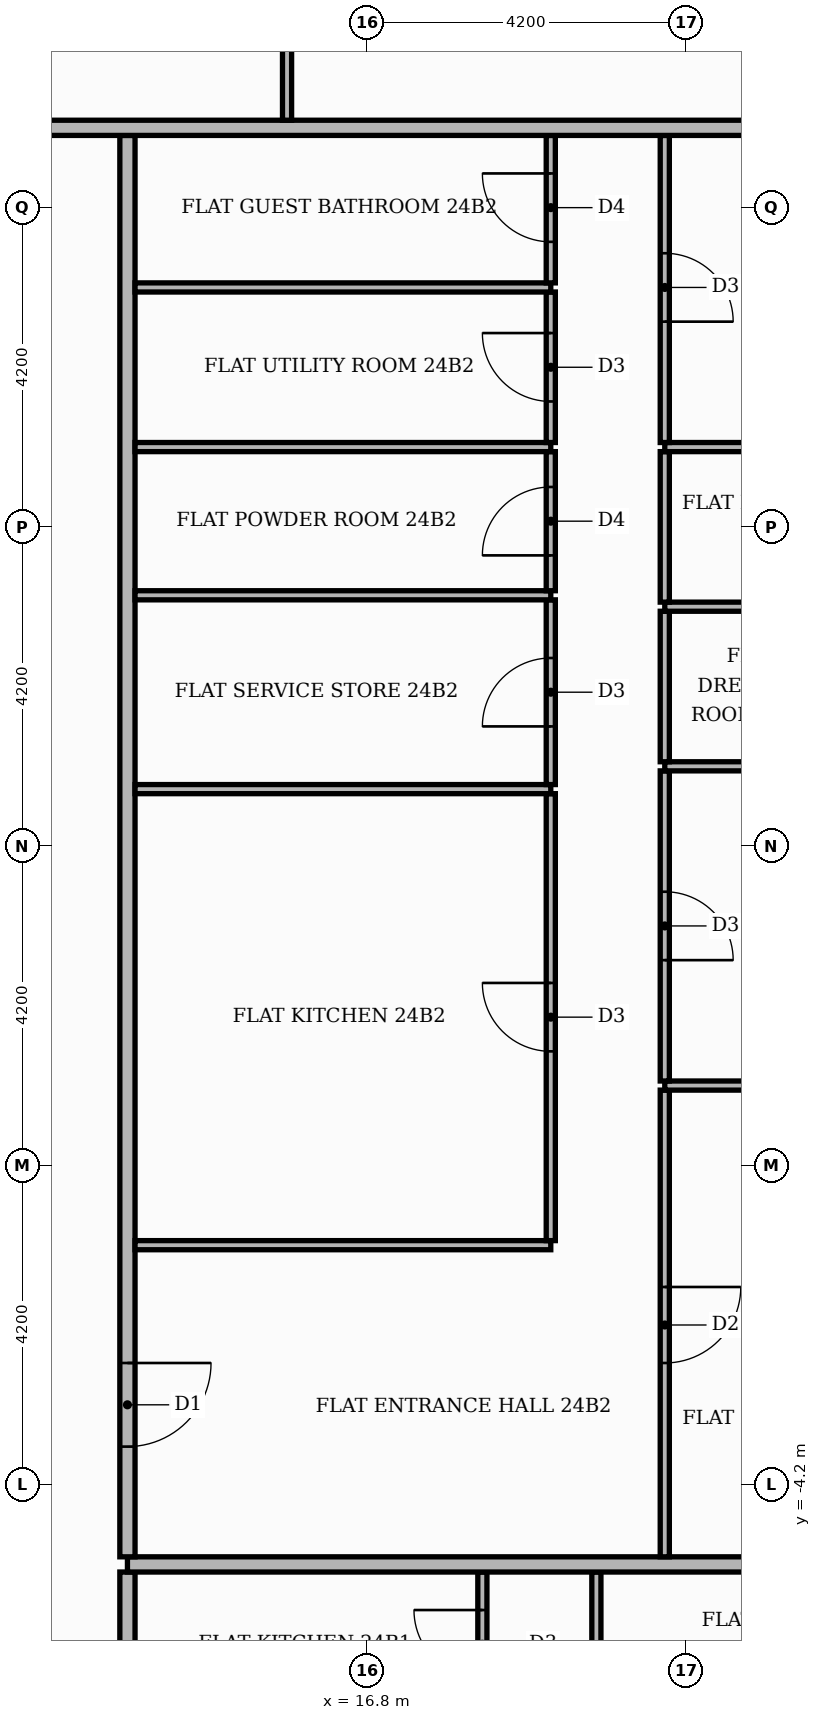
"""IFC4 building model, lengths in metres.
Left out: names, types, materials, properties, quantities, classifications, styles, units other than length and angle.
Written with IfcOpenShell. Run it as: python <this file> out.ifc"""

import sys

from ifc_helpers import new_model, si_unit, direction, frame, frame_2d, origin, place, context, subcontext, project, spatial, rectangle, extrude, element, fill, save


model = new_model("IFC4")
c1 = context("Model", 3, precision=1e-05, world=origin(), true_north=direction((0.0, 1.0)))
c2 = subcontext(c1, "Body", "Model", "MODEL_VIEW")
j1 = project(units=[si_unit("LENGTHUNIT", "METRE"), si_unit("PLANEANGLEUNIT", "RADIAN")], contexts=[c1])
p1 = place(None, origin())
s1 = spatial("IfcSite", under=j1, at=p1, CompositionType="ELEMENT")
p2 = place(p1, origin())
s2 = spatial("IfcBuilding", under=s1, at=p2, CompositionType="ELEMENT")
p3 = place(p2, frame((0.0, 0.0, 102.6)))
s3 = spatial("IfcBuildingStorey", under=s2, at=p3, CompositionType="ELEMENT", Elevation=102.6)
p4 = place(p3, frame((13.65, -13.55, 0.0), z_axis=(0.0, 0.0, 1.0), x_axis=(0.0, 1.0, 0.0)))
e1 = element("IfcWall", 1, at=p4, inside=s3, PredefinedType="PARTITIONING", context=c2, shape_type="SweptSolid", body=[
    extrude(rectangle(XDim=8.2, YDim=0.2, at=frame_2d((4.1, 0.0))), origin(), (0.0, 0.0, 1.0), 3.48),
])
p5 = place(p4, frame((1.45, 0.0, 0.0)))
e2 = element("IfcOpeningElement", 2, at=p5, cuts=e1, PredefinedType="OPENING", context=c2, shape_type="SweptSolid", body=[
    extrude(rectangle(XDim=1.1, YDim=2.4, at=frame_2d((0.55, 1.2))), frame((0.0, 0.11, 0.0), z_axis=(0.0, -1.0, 0.0), x_axis=(1.0, 0.0, 0.0)), (0.0, 0.0, 1.0), 0.22),
])
p6 = place(p3, frame((18.32, -7.29, 0.0), z_axis=(0.0, 0.0, 1.0), x_axis=(0.0, 1.0, 0.0)))
e3 = element("IfcWall", 3, at=p6, inside=s3, PredefinedType="PARTITIONING", context=c2, shape_type="SweptSolid", body=[
    extrude(rectangle(XDim=1.94, YDim=0.12, at=frame_2d((0.97, 0.0))), origin(), (0.0, 0.0, 1.0), 3.48),
])
p7 = place(p6, frame((0.54, 0.0, 0.0)))
e4 = element("IfcOpeningElement", 4, at=p7, cuts=e3, PredefinedType="OPENING", context=c2, shape_type="SweptSolid", body=[
    extrude(rectangle(XDim=0.9, YDim=2.1, at=frame_2d((0.45, 1.05))), frame((0.0, 0.07, 0.0), z_axis=(0.0, -1.0, 0.0), x_axis=(1.0, 0.0, 0.0)), (0.0, 0.0, 1.0), 0.14),
])
p8 = place(p3, frame((19.82, -7.29, 0.0), z_axis=(0.0, 0.0, 1.0), x_axis=(0.0, 1.0, 0.0)))
e5 = element("IfcWall", 5, at=p8, inside=s3, PredefinedType="PARTITIONING", context=c2, shape_type="SweptSolid", body=[
    extrude(rectangle(XDim=1.94, YDim=0.12, at=frame_2d((0.97, 0.0))), origin(), (0.0, 0.0, 1.0), 3.48),
])
p9 = place(p3, frame((13.65, -5.25, 0.0), z_axis=(0.0, 0.0, 1.0), x_axis=(1.0, 0.0, 0.0)))
e6 = element("IfcWall", 6, at=p9, inside=s3, PredefinedType="PARTITIONING", context=c2, shape_type="SweptSolid", body=[
    extrude(rectangle(XDim=11.77, YDim=0.2, at=frame_2d((5.885, 0.0))), origin(), (0.0, 0.0, 1.0), 3.48),
])
p10 = place(p3, frame((13.65, -5.15, 0.0), z_axis=(0.0, 0.0, 1.0), x_axis=(0.0, 1.0, 0.0)))
e7 = element("IfcWall", 7, at=p10, inside=s3, PredefinedType="PARTITIONING", context=c2, shape_type="SweptSolid", body=[
    extrude(rectangle(XDim=18.7, YDim=0.2, at=frame_2d((9.35, 0.0))), origin(), (0.0, 0.0, 1.0), 3.48),
])
p11 = place(p10, frame((1.45, 0.0, 0.0)))
e8 = element("IfcOpeningElement", 8, at=p11, cuts=e7, PredefinedType="OPENING", context=c2, shape_type="SweptSolid", body=[
    extrude(rectangle(XDim=1.1, YDim=2.4, at=frame_2d((0.55, 1.2))), frame((0.0, 0.11, 0.0), z_axis=(0.0, -1.0, 0.0), x_axis=(1.0, 0.0, 0.0)), (0.0, 0.0, 1.0), 0.22),
])
p12 = place(p3, frame((20.72, -5.15, 0.0), z_axis=(0.0, 0.0, 1.0), x_axis=(0.0, 1.0, 0.0)))
e9 = element("IfcWall", 9, at=p12, inside=s3, PredefinedType="PARTITIONING", context=c2, shape_type="SweptSolid", body=[
    extrude(rectangle(XDim=6.14, YDim=0.12, at=frame_2d((3.07, 0.0))), origin(), (0.0, 0.0, 1.0), 3.48),
])
p13 = place(p12, frame((2.55, 0.0, 0.0)))
e10 = element("IfcOpeningElement", 10, at=p13, cuts=e9, PredefinedType="OPENING", context=c2, shape_type="SweptSolid", body=[
    extrude(rectangle(XDim=1.0, YDim=2.1, at=frame_2d((0.5, 1.05))), frame((0.0, 0.07, 0.0), z_axis=(0.0, -1.0, 0.0), x_axis=(1.0, 0.0, 0.0)), (0.0, 0.0, 1.0), 0.14),
])
p14 = place(p3, frame((13.75, -1.05, 0.0), z_axis=(0.0, 0.0, 1.0), x_axis=(1.0, 0.0, 0.0)))
e11 = element("IfcWall", 11, at=p14, inside=s3, PredefinedType="PARTITIONING", context=c2, shape_type="SweptSolid", body=[
    extrude(rectangle(XDim=5.47, YDim=0.12, at=frame_2d((2.735, 0.0))), origin(), (0.0, 0.0, 1.0), 3.48),
])
p15 = place(p3, frame((19.22, -0.99, 0.0), z_axis=(0.0, 0.0, 1.0), x_axis=(0.0, 1.0, 0.0)))
e12 = element("IfcWall", 12, at=p15, inside=s3, PredefinedType="PARTITIONING", context=c2, shape_type="SweptSolid", body=[
    extrude(rectangle(XDim=5.88, YDim=0.12, at=frame_2d((2.94, 0.0))), origin(), (0.0, 0.0, 1.0), 3.48),
])
p16 = place(p15, frame((2.49, 0.0, 0.0)))
e13 = element("IfcOpeningElement", 13, at=p16, cuts=e12, PredefinedType="OPENING", context=c2, shape_type="SweptSolid", body=[
    extrude(rectangle(XDim=0.9, YDim=2.1, at=frame_2d((0.45, 1.05))), frame((0.0, 0.07, 0.0), z_axis=(0.0, -1.0, 0.0), x_axis=(1.0, 0.0, 0.0)), (0.0, 0.0, 1.0), 0.14),
])
p17 = place(p3, frame((20.72, 1.05, 0.0), z_axis=(0.0, 0.0, 1.0), x_axis=(1.0, 0.0, 0.0)))
e14 = element("IfcWall", 14, at=p17, inside=s3, PredefinedType="PARTITIONING", context=c2, shape_type="SweptSolid", body=[
    extrude(rectangle(XDim=4.7, YDim=0.12, at=frame_2d((2.35, 0.0))), origin(), (0.0, 0.0, 1.0), 3.48),
])
p18 = place(p3, frame((20.72, 1.11, 0.0), z_axis=(0.0, 0.0, 1.0), x_axis=(0.0, 1.0, 0.0)))
e15 = element("IfcWall", 15, at=p18, inside=s3, PredefinedType="PARTITIONING", context=c2, shape_type="SweptSolid", body=[
    extrude(rectangle(XDim=4.08, YDim=0.12, at=frame_2d((2.04, 0.0))), origin(), (0.0, 0.0, 1.0), 3.48),
])
p19 = place(p18, frame((1.59, 0.0, 0.0)))
e16 = element("IfcOpeningElement", 16, at=p19, cuts=e15, PredefinedType="OPENING", context=c2, shape_type="SweptSolid", body=[
    extrude(rectangle(XDim=0.9, YDim=2.1, at=frame_2d((0.45, 1.05))), frame((0.0, 0.07, 0.0), z_axis=(0.0, -1.0, 0.0), x_axis=(1.0, 0.0, 0.0)), (0.0, 0.0, 1.0), 0.14),
])
p20 = place(p3, frame((13.75, 4.95, 0.0), z_axis=(0.0, 0.0, 1.0), x_axis=(1.0, 0.0, 0.0)))
e17 = element("IfcWall", 17, at=p20, inside=s3, PredefinedType="PARTITIONING", context=c2, shape_type="SweptSolid", body=[
    extrude(rectangle(XDim=5.47, YDim=0.12, at=frame_2d((2.735, 0.0))), origin(), (0.0, 0.0, 1.0), 3.48),
])
p21 = place(p3, frame((19.22, 5.01, 0.0), z_axis=(0.0, 0.0, 1.0), x_axis=(0.0, 1.0, 0.0)))
e18 = element("IfcWall", 18, at=p21, inside=s3, PredefinedType="PARTITIONING", context=c2, shape_type="SweptSolid", body=[
    extrude(rectangle(XDim=2.43, YDim=0.12, at=frame_2d((1.215, 0.0))), origin(), (0.0, 0.0, 1.0), 3.48),
])
p22 = place(p21, frame((0.765, 0.0, 0.0)))
e19 = element("IfcOpeningElement", 19, at=p22, cuts=e18, PredefinedType="OPENING", context=c2, shape_type="SweptSolid", body=[
    extrude(rectangle(XDim=0.9, YDim=2.1, at=frame_2d((0.45, 1.05))), frame((0.0, 0.07, 0.0), z_axis=(0.0, -1.0, 0.0), x_axis=(1.0, 0.0, 0.0)), (0.0, 0.0, 1.0), 0.14),
])
p23 = place(p3, frame((20.72, 5.25, 0.0), z_axis=(0.0, 0.0, 1.0), x_axis=(1.0, 0.0, 0.0)))
e20 = element("IfcWall", 20, at=p23, inside=s3, PredefinedType="PARTITIONING", context=c2, shape_type="SweptSolid", body=[
    extrude(rectangle(XDim=4.7, YDim=0.12, at=frame_2d((2.35, 0.0))), origin(), (0.0, 0.0, 1.0), 3.48),
])
p24 = place(p23, frame((2.05, 0.0, 0.0)))
e21 = element("IfcOpeningElement", 21, at=p24, cuts=e20, PredefinedType="OPENING", context=c2, shape_type="SweptSolid", body=[
    extrude(rectangle(XDim=0.9, YDim=2.1, at=frame_2d((0.45, 1.05))), frame((0.0, 0.07, 0.0), z_axis=(0.0, -1.0, 0.0), x_axis=(1.0, 0.0, 0.0)), (0.0, 0.0, 1.0), 0.14),
])
p25 = place(p3, frame((20.72, 5.31, 0.0), z_axis=(0.0, 0.0, 1.0), x_axis=(0.0, 1.0, 0.0)))
e22 = element("IfcWall", 22, at=p25, inside=s3, PredefinedType="PARTITIONING", context=c2, shape_type="SweptSolid", body=[
    extrude(rectangle(XDim=1.98, YDim=0.12, at=frame_2d((0.99, 0.0))), origin(), (0.0, 0.0, 1.0), 3.48),
])
p26 = place(p3, frame((20.72, 7.35, 0.0), z_axis=(0.0, 0.0, 1.0), x_axis=(1.0, 0.0, 0.0)))
e23 = element("IfcWall", 23, at=p26, inside=s3, PredefinedType="PARTITIONING", context=c2, shape_type="SweptSolid", body=[
    extrude(rectangle(XDim=4.7, YDim=0.12, at=frame_2d((2.35, 0.0))), origin(), (0.0, 0.0, 1.0), 3.48),
])
p27 = place(p26, frame((2.05, 0.0, 0.0)))
e24 = element("IfcOpeningElement", 24, at=p27, cuts=e23, PredefinedType="OPENING", context=c2, shape_type="SweptSolid", body=[
    extrude(rectangle(XDim=0.9, YDim=2.1, at=frame_2d((0.45, 1.05))), frame((0.0, 0.07, 0.0), z_axis=(0.0, -1.0, 0.0), x_axis=(1.0, 0.0, 0.0)), (0.0, 0.0, 1.0), 0.14),
])
p28 = place(p3, frame((20.72, 7.41, 0.0), z_axis=(0.0, 0.0, 1.0), x_axis=(0.0, 1.0, 0.0)))
e25 = element("IfcWall", 25, at=p28, inside=s3, PredefinedType="PARTITIONING", context=c2, shape_type="SweptSolid", body=[
    extrude(rectangle(XDim=1.98, YDim=0.12, at=frame_2d((0.99, 0.0))), origin(), (0.0, 0.0, 1.0), 3.48),
])
p29 = place(p3, frame((13.75, 7.5, 0.0), z_axis=(0.0, 0.0, 1.0), x_axis=(1.0, 0.0, 0.0)))
e26 = element("IfcWall", 26, at=p29, inside=s3, PredefinedType="PARTITIONING", context=c2, shape_type="SweptSolid", body=[
    extrude(rectangle(XDim=5.47, YDim=0.12, at=frame_2d((2.735, 0.0))), origin(), (0.0, 0.0, 1.0), 3.48),
])
p30 = place(p3, frame((19.22, 7.56, 0.0), z_axis=(0.0, 0.0, 1.0), x_axis=(0.0, 1.0, 0.0)))
e27 = element("IfcWall", 27, at=p30, inside=s3, PredefinedType="PARTITIONING", context=c2, shape_type="SweptSolid", body=[
    extrude(rectangle(XDim=1.83, YDim=0.12, at=frame_2d((0.915, 0.0))), origin(), (0.0, 0.0, 1.0), 3.48),
])
p31 = place(p30, frame((0.465, 0.0, 0.0)))
e28 = element("IfcOpeningElement", 28, at=p31, cuts=e27, PredefinedType="OPENING", context=c2, shape_type="SweptSolid", body=[
    extrude(rectangle(XDim=0.9, YDim=2.1, at=frame_2d((0.45, 1.05))), frame((0.0, 0.07, 0.0), z_axis=(0.0, -1.0, 0.0), x_axis=(1.0, 0.0, 0.0)), (0.0, 0.0, 1.0), 0.14),
])
p32 = place(p3, frame((13.75, 9.45, 0.0), z_axis=(0.0, 0.0, 1.0), x_axis=(1.0, 0.0, 0.0)))
e29 = element("IfcWall", 29, at=p32, inside=s3, PredefinedType="PARTITIONING", context=c2, shape_type="SweptSolid", body=[
    extrude(rectangle(XDim=5.47, YDim=0.12, at=frame_2d((2.735, 0.0))), origin(), (0.0, 0.0, 1.0), 3.48),
])
p33 = place(p3, frame((20.72, 9.45, 0.0), z_axis=(0.0, 0.0, 1.0), x_axis=(1.0, 0.0, 0.0)))
e30 = element("IfcWall", 30, at=p33, inside=s3, PredefinedType="PARTITIONING", context=c2, shape_type="SweptSolid", body=[
    extrude(rectangle(XDim=4.7, YDim=0.12, at=frame_2d((2.35, 0.0))), origin(), (0.0, 0.0, 1.0), 3.48),
])
p34 = place(p3, frame((19.22, 9.51, 0.0), z_axis=(0.0, 0.0, 1.0), x_axis=(0.0, 1.0, 0.0)))
e31 = element("IfcWall", 31, at=p34, inside=s3, PredefinedType="PARTITIONING", context=c2, shape_type="SweptSolid", body=[
    extrude(rectangle(XDim=1.98, YDim=0.12, at=frame_2d((0.99, 0.0))), origin(), (0.0, 0.0, 1.0), 3.48),
])
p35 = place(p34, frame((0.54, 0.0, 0.0)))
e32 = element("IfcOpeningElement", 32, at=p35, cuts=e31, PredefinedType="OPENING", context=c2, shape_type="SweptSolid", body=[
    extrude(rectangle(XDim=0.9, YDim=2.1, at=frame_2d((0.45, 1.05))), frame((0.0, 0.07, 0.0), z_axis=(0.0, -1.0, 0.0), x_axis=(1.0, 0.0, 0.0)), (0.0, 0.0, 1.0), 0.14),
])
p36 = place(p3, frame((20.72, 9.51, 0.0), z_axis=(0.0, 0.0, 1.0), x_axis=(0.0, 1.0, 0.0)))
e33 = element("IfcWall", 33, at=p36, inside=s3, PredefinedType="PARTITIONING", context=c2, shape_type="SweptSolid", body=[
    extrude(rectangle(XDim=4.04, YDim=0.12, at=frame_2d((2.02, 0.0))), origin(), (0.0, 0.0, 1.0), 3.48),
])
p37 = place(p36, frame((1.59, 0.0, 0.0)))
e34 = element("IfcOpeningElement", 34, at=p37, cuts=e33, PredefinedType="OPENING", context=c2, shape_type="SweptSolid", body=[
    extrude(rectangle(XDim=0.9, YDim=2.1, at=frame_2d((0.45, 1.05))), frame((0.0, 0.07, 0.0), z_axis=(0.0, -1.0, 0.0), x_axis=(1.0, 0.0, 0.0)), (0.0, 0.0, 1.0), 0.14),
])
p38 = place(p3, frame((13.75, 11.55, 0.0), z_axis=(0.0, 0.0, 1.0), x_axis=(1.0, 0.0, 0.0)))
e35 = element("IfcWall", 35, at=p38, inside=s3, PredefinedType="PARTITIONING", context=c2, shape_type="SweptSolid", body=[
    extrude(rectangle(XDim=5.47, YDim=0.12, at=frame_2d((2.735, 0.0))), origin(), (0.0, 0.0, 1.0), 3.48),
])
p39 = place(p3, frame((19.22, 11.61, 0.0), z_axis=(0.0, 0.0, 1.0), x_axis=(0.0, 1.0, 0.0)))
e36 = element("IfcWall", 36, at=p39, inside=s3, PredefinedType="PARTITIONING", context=c2, shape_type="SweptSolid", body=[
    extrude(rectangle(XDim=1.94, YDim=0.12, at=frame_2d((0.97, 0.0))), origin(), (0.0, 0.0, 1.0), 3.48),
])
p40 = place(p39, frame((0.54, 0.0, 0.0)))
e37 = element("IfcOpeningElement", 37, at=p40, cuts=e36, PredefinedType="OPENING", context=c2, shape_type="SweptSolid", body=[
    extrude(rectangle(XDim=0.9, YDim=2.1, at=frame_2d((0.45, 1.05))), frame((0.0, 0.07, 0.0), z_axis=(0.0, -1.0, 0.0), x_axis=(1.0, 0.0, 0.0)), (0.0, 0.0, 1.0), 0.14),
])
p41 = place(p3, frame((-13.65, 13.65, 0.0), z_axis=(0.0, 0.0, 1.0), x_axis=(1.0, 0.0, 0.0)))
e38 = element("IfcWall", 38, at=p41, inside=s3, PredefinedType="PARTITIONING", context=c2, shape_type="SweptSolid", body=[
    extrude(rectangle(XDim=39.07, YDim=0.2, at=frame_2d((19.535, 0.0))), origin(), (0.0, 0.0, 1.0), 3.48),
])
p42 = place(p41, frame((24.65, 0.0, 0.0)))
e39 = element("IfcOpeningElement", 39, at=p42, cuts=e38, PredefinedType="OPENING", context=c2, shape_type="SweptSolid", body=[
    extrude(rectangle(XDim=1.1, YDim=2.4, at=frame_2d((0.55, 1.2))), frame((0.0, 0.11, 0.0), z_axis=(0.0, -1.0, 0.0), x_axis=(1.0, 0.0, 0.0)), (0.0, 0.0, 1.0), 0.22),
])
p43 = place(p41, frame((14.15, 0.0, 0.0)))
e40 = element("IfcOpeningElement", 40, at=p43, cuts=e38, PredefinedType="OPENING", context=c2, shape_type="SweptSolid", body=[
    extrude(rectangle(XDim=1.1, YDim=2.4, at=frame_2d((0.55, 1.2))), frame((0.0, 0.11, 0.0), z_axis=(0.0, -1.0, 0.0), x_axis=(1.0, 0.0, 0.0)), (0.0, 0.0, 1.0), 0.22),
])
p44 = place(p3, frame((15.75, 13.75, 0.0), z_axis=(0.0, 0.0, 1.0), x_axis=(0.0, 1.0, 0.0)))
e41 = element("IfcWall", 41, at=p44, inside=s3, PredefinedType="PARTITIONING", context=c2, shape_type="SweptSolid", body=[
    extrude(rectangle(XDim=6.61, YDim=0.12, at=frame_2d((3.305, 0.0))), origin(), (0.0, 0.0, 1.0), 3.48),
])
p45 = place(p44, frame((2.785, 0.0, 0.0)))
e42 = element("IfcOpeningElement", 42, at=p45, cuts=e41, PredefinedType="OPENING", context=c2, shape_type="SweptSolid", body=[
    extrude(rectangle(XDim=1.0, YDim=2.1, at=frame_2d((0.5, 1.05))), frame((0.0, 0.07, 0.0), z_axis=(0.0, -1.0, 0.0), x_axis=(1.0, 0.0, 0.0)), (0.0, 0.0, 1.0), 0.14),
])
p46 = place(p7, origin())
e43 = element("IfcDoor", 43, at=p46, inside=s3, OperationType="SINGLE_SWING_RIGHT", PredefinedType="DOOR", context=c2, shape_type="SweptSolid", body=[
    extrude(rectangle(XDim=0.9, YDim=2.1, at=frame_2d((0.45, 1.05))), frame((0.0, 0.025, 0.0), z_axis=(0.0, -1.0, 0.0), x_axis=(1.0, 0.0, 0.0)), (0.0, 0.0, 1.0), 0.05),
])
fill(e4, e43)
p47 = place(p11, frame((1.1, 0.0, 0.0), z_axis=(0.0, 0.0, 1.0), x_axis=(-1.0, 0.0, 0.0)))
e44 = element("IfcDoor", 44, at=p47, inside=s3, OperationType="SINGLE_SWING_RIGHT", PredefinedType="DOOR", context=c2, shape_type="SweptSolid", body=[
    extrude(rectangle(XDim=1.1, YDim=2.4, at=frame_2d((0.55, 1.2))), frame((0.0, 0.025, 0.0), z_axis=(0.0, -1.0, 0.0), x_axis=(1.0, 0.0, 0.0)), (0.0, 0.0, 1.0), 0.05),
])
fill(e8, e44)
p48 = place(p16, origin())
e45 = element("IfcDoor", 45, at=p48, inside=s3, OperationType="SINGLE_SWING_RIGHT", PredefinedType="DOOR", context=c2, shape_type="SweptSolid", body=[
    extrude(rectangle(XDim=0.9, YDim=2.1, at=frame_2d((0.45, 1.05))), frame((0.0, 0.025, 0.0), z_axis=(0.0, -1.0, 0.0), x_axis=(1.0, 0.0, 0.0)), (0.0, 0.0, 1.0), 0.05),
])
fill(e13, e45)
p49 = place(p22, origin())
e46 = element("IfcDoor", 46, at=p49, inside=s3, OperationType="SINGLE_SWING_LEFT", PredefinedType="DOOR", context=c2, shape_type="SweptSolid", body=[
    extrude(rectangle(XDim=0.9, YDim=2.1, at=frame_2d((0.45, 1.05))), frame((0.0, 0.025, 0.0), z_axis=(0.0, -1.0, 0.0), x_axis=(1.0, 0.0, 0.0)), (0.0, 0.0, 1.0), 0.05),
])
fill(e19, e46)
p50 = place(p31, origin())
e47 = element("IfcDoor", 47, at=p50, inside=s3, OperationType="SINGLE_SWING_LEFT", PredefinedType="DOOR", context=c2, shape_type="SweptSolid", body=[
    extrude(rectangle(XDim=0.9, YDim=2.1, at=frame_2d((0.45, 1.05))), frame((0.0, 0.025, 0.0), z_axis=(0.0, -1.0, 0.0), x_axis=(1.0, 0.0, 0.0)), (0.0, 0.0, 1.0), 0.05),
])
fill(e28, e47)
p51 = place(p35, origin())
e48 = element("IfcDoor", 48, at=p51, inside=s3, OperationType="SINGLE_SWING_RIGHT", PredefinedType="DOOR", context=c2, shape_type="SweptSolid", body=[
    extrude(rectangle(XDim=0.9, YDim=2.1, at=frame_2d((0.45, 1.05))), frame((0.0, 0.025, 0.0), z_axis=(0.0, -1.0, 0.0), x_axis=(1.0, 0.0, 0.0)), (0.0, 0.0, 1.0), 0.05),
])
fill(e32, e48)
p52 = place(p40, origin())
e49 = element("IfcDoor", 49, at=p52, inside=s3, OperationType="SINGLE_SWING_RIGHT", PredefinedType="DOOR", context=c2, shape_type="SweptSolid", body=[
    extrude(rectangle(XDim=0.9, YDim=2.1, at=frame_2d((0.45, 1.05))), frame((0.0, 0.025, 0.0), z_axis=(0.0, -1.0, 0.0), x_axis=(1.0, 0.0, 0.0)), (0.0, 0.0, 1.0), 0.05),
])
fill(e37, e49)
p53 = place(p13, frame((1.0, 0.0, 0.0), z_axis=(0.0, 0.0, 1.0), x_axis=(-1.0, 0.0, 0.0)))
e50 = element("IfcDoor", 50, at=p53, inside=s3, OperationType="SINGLE_SWING_RIGHT", PredefinedType="DOOR", context=c2, shape_type="SweptSolid", body=[
    extrude(rectangle(XDim=1.0, YDim=2.1, at=frame_2d((0.5, 1.05))), frame((0.0, 0.025, 0.0), z_axis=(0.0, -1.0, 0.0), x_axis=(1.0, 0.0, 0.0)), (0.0, 0.0, 1.0), 0.05),
])
fill(e10, e50)
p54 = place(p19, frame((0.9, 0.0, 0.0), z_axis=(0.0, 0.0, 1.0), x_axis=(-1.0, 0.0, 0.0)))
e51 = element("IfcDoor", 51, at=p54, inside=s3, OperationType="SINGLE_SWING_LEFT", PredefinedType="DOOR", context=c2, shape_type="SweptSolid", body=[
    extrude(rectangle(XDim=0.9, YDim=2.1, at=frame_2d((0.45, 1.05))), frame((0.0, 0.025, 0.0), z_axis=(0.0, -1.0, 0.0), x_axis=(1.0, 0.0, 0.0)), (0.0, 0.0, 1.0), 0.05),
])
fill(e16, e51)
p55 = place(p37, frame((0.9, 0.0, 0.0), z_axis=(0.0, 0.0, 1.0), x_axis=(-1.0, 0.0, 0.0)))
e52 = element("IfcDoor", 52, at=p55, inside=s3, OperationType="SINGLE_SWING_LEFT", PredefinedType="DOOR", context=c2, shape_type="SweptSolid", body=[
    extrude(rectangle(XDim=0.9, YDim=2.1, at=frame_2d((0.45, 1.05))), frame((0.0, 0.025, 0.0), z_axis=(0.0, -1.0, 0.0), x_axis=(1.0, 0.0, 0.0)), (0.0, 0.0, 1.0), 0.05),
])
fill(e34, e52)
save(model, sys.argv[1])
